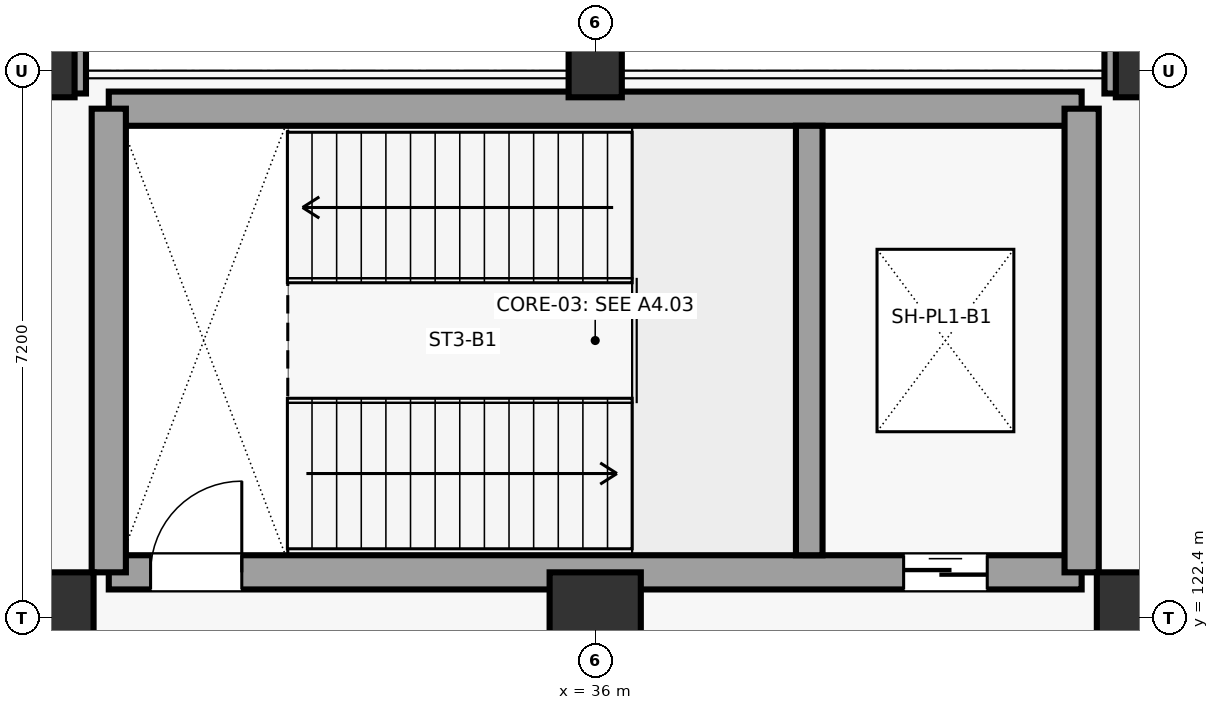
"""IFC4 building model, lengths in metres.
Left out: names, types, materials, properties, quantities, classifications, styles, units other than length and angle.
Written with IfcOpenShell. Run it as: python <this file> out.ifc"""

import sys

from ifc_helpers import new_model, si_unit, direction, frame, frame_2d, origin, origin_2d, place, context, subcontext, project, spatial, rectangle, circle, extrude, element, fill, save


model = new_model("IFC4")
c1 = context("Model", 3, precision=1e-05, world=origin(), true_north=direction((0.0, 1.0)))
c2 = subcontext(c1, "Body", "Model", "MODEL_VIEW")
j1 = project(units=[si_unit("LENGTHUNIT", "METRE"), si_unit("PLANEANGLEUNIT", "RADIAN")], contexts=[c1])
p1 = place(None, origin())
s1 = spatial("IfcSite", under=j1, at=p1, CompositionType="ELEMENT")
p2 = place(p1, origin())
s2 = spatial("IfcBuilding", under=s1, at=p2, CompositionType="ELEMENT")
p3 = place(p2, frame((0.0, 0.0, -5.4)))
s3 = spatial("IfcBuildingStorey", under=s2, at=p3, CompositionType="ELEMENT", Elevation=-5.4)
p4 = place(p3, frame((28.8, 122.4, 0.0), z_axis=(0.0, 0.0, 1.0), x_axis=(1.0, 0.0, 0.0)))
e1 = element("IfcColumn", 1, at=p4, inside=s3, PredefinedType="COLUMN", context=c2, shape_type="SweptSolid", body=[
    extrude(circle(Radius=0.6, at=origin_2d()), origin(), (0.0, 0.0, 1.0), 5.4),
])
p5 = place(p3, frame((28.8, 129.6, 0.0), z_axis=(0.0, 0.0, 1.0), x_axis=(1.0, 0.0, 0.0)))
e2 = element("IfcColumn", 2, at=p5, inside=s3, PredefinedType="COLUMN", context=c2, shape_type="SweptSolid", body=[
    extrude(rectangle(XDim=0.7, YDim=0.7, at=origin_2d()), origin(), (0.0, 0.0, 1.0), 5.4),
])
p6 = place(p3, frame((36.0, 122.4, 0.0), z_axis=(0.0, 0.0, 1.0), x_axis=(1.0, 0.0, 0.0)))
e3 = element("IfcColumn", 3, at=p6, inside=s3, PredefinedType="COLUMN", context=c2, shape_type="SweptSolid", body=[
    extrude(circle(Radius=0.6, at=origin_2d()), origin(), (0.0, 0.0, 1.0), 5.4),
])
p7 = place(p3, frame((36.0, 129.6, 0.0), z_axis=(0.0, 0.0, 1.0), x_axis=(1.0, 0.0, 0.0)))
e4 = element("IfcColumn", 4, at=p7, inside=s3, PredefinedType="COLUMN", context=c2, shape_type="SweptSolid", body=[
    extrude(rectangle(XDim=0.7, YDim=0.7, at=origin_2d()), origin(), (0.0, 0.0, 1.0), 5.4),
])
p8 = place(p3, frame((43.2, 122.4, 0.0), z_axis=(0.0, 0.0, 1.0), x_axis=(1.0, 0.0, 0.0)))
e5 = element("IfcColumn", 5, at=p8, inside=s3, PredefinedType="COLUMN", context=c2, shape_type="SweptSolid", body=[
    extrude(circle(Radius=0.6, at=origin_2d()), origin(), (0.0, 0.0, 1.0), 5.4),
])
p9 = place(p3, frame((43.2, 129.6, 0.0), z_axis=(0.0, 0.0, 1.0), x_axis=(1.0, 0.0, 0.0)))
e6 = element("IfcColumn", 6, at=p9, inside=s3, PredefinedType="COLUMN", context=c2, shape_type="SweptSolid", body=[
    extrude(rectangle(XDim=0.7, YDim=0.7, at=origin_2d()), origin(), (0.0, 0.0, 1.0), 5.4),
])
p10 = place(p3, frame((0.0, 129.6, 0.0), z_axis=(0.0, 0.0, 1.0), x_axis=(1.0, 0.0, 0.0)))
e7 = element("IfcWall", 7, at=p10, inside=s3, PredefinedType="USERDEFINED", context=c2, shape_type="SweptSolid", body=[
    extrude(rectangle(XDim=29.3, YDim=0.6, at=frame_2d((14.65, 0.0))), origin(), (0.0, 0.0, 1.0), 4.98),
])
p11 = place(p3, frame((42.7, 129.6, 0.0), z_axis=(0.0, 0.0, 1.0), x_axis=(1.0, 0.0, 0.0)))
e8 = element("IfcWall", 8, at=p11, inside=s3, PredefinedType="USERDEFINED", context=c2, shape_type="SweptSolid", body=[
    extrude(rectangle(XDim=29.8, YDim=0.6, at=frame_2d((14.9, 0.0))), origin(), (0.0, 0.0, 1.0), 4.98),
])
p12 = place(p3, frame((29.6, 123.0, 0.0), z_axis=(0.0, 0.0, 1.0), x_axis=(1.0, 0.0, 0.0)))
e9 = element("IfcWall", 9, at=p12, inside=s3, PredefinedType="SHEAR", context=c2, shape_type="SweptSolid", body=[
    extrude(rectangle(XDim=12.8, YDim=0.45, at=frame_2d((6.4, 0.0))), origin(), (0.0, 0.0, 1.0), 5.02),
])
p13 = place(p12, frame((0.55, 0.0, 0.0)))
e10 = element("IfcOpeningElement", 10, at=p13, cuts=e9, PredefinedType="OPENING", context=c2, shape_type="SweptSolid", body=[
    extrude(rectangle(XDim=1.2, YDim=2.25, at=frame_2d((0.6, 1.125))), frame((0.0, 0.235, 0.0), z_axis=(0.0, -1.0, 0.0), x_axis=(1.0, 0.0, 0.0)), (0.0, 0.0, 1.0), 0.47),
])
p14 = place(p12, frame((10.458, 0.0, 0.0)))
e11 = element("IfcOpeningElement", 11, at=p14, cuts=e9, PredefinedType="OPENING", context=c2, shape_type="SweptSolid", body=[
    extrude(rectangle(XDim=1.1, YDim=2.2, at=frame_2d((0.55, 1.1))), frame((0.0, 0.235, 0.0), z_axis=(0.0, -1.0, 0.0), x_axis=(1.0, 0.0, 0.0)), (0.0, 0.0, 1.0), 0.47),
])
p15 = place(p3, frame((29.6, 129.1, 0.0), z_axis=(0.0, 0.0, 1.0), x_axis=(1.0, 0.0, 0.0)))
e12 = element("IfcWall", 12, at=p15, inside=s3, PredefinedType="SHEAR", context=c2, shape_type="SweptSolid", body=[
    extrude(rectangle(XDim=12.8, YDim=0.45, at=frame_2d((6.4, 0.0))), origin(), (0.0, 0.0, 1.0), 5.02),
])
for number, where, z_axis, x_axis in (
    (13, (29.6, 123.0, 0.0), (0.0, 0.0, 1.0), (0.0, 1.0, 0.0)),
    (14, (42.4, 123.0, 0.0), (0.0, 0.0, 1.0), (0.0, 1.0, 0.0)),
):
    element("IfcWall", number, at=place(p3, frame(where, z_axis=z_axis, x_axis=x_axis)), inside=s3, PredefinedType="SHEAR", context=c2, shape_type="SweptSolid", body=[
        extrude(rectangle(XDim=6.1, YDim=0.45, at=frame_2d((3.05, 0.0))), origin(), (0.0, 0.0, 1.0), 5.02),
    ])
p16 = place(p3, frame((38.816, 123.225, 0.0), z_axis=(0.0, 0.0, 1.0), x_axis=(0.0, 1.0, 0.0)))
e15 = element("IfcWall", 15, at=p16, inside=s3, PredefinedType="SHEAR", context=c2, shape_type="SweptSolid", body=[
    extrude(rectangle(XDim=5.65, YDim=0.35, at=frame_2d((2.825, 0.0))), origin(), (0.0, 0.0, 1.0), 5.02),
])
p17 = place(p13, origin())
e16 = element("IfcDoor", 16, at=p17, inside=s3, OperationType="SINGLE_SWING_RIGHT", PredefinedType="DOOR", context=c2, shape_type="SweptSolid", body=[
    extrude(rectangle(XDim=1.2, YDim=2.25, at=frame_2d((0.6, 1.125))), frame((0.0, 0.025, 0.0), z_axis=(0.0, -1.0, 0.0), x_axis=(1.0, 0.0, 0.0)), (0.0, 0.0, 1.0), 0.05),
])
fill(e10, e16)
p18 = place(p14, origin())
e17 = element("IfcDoor", 17, at=p18, inside=s3, OperationType="SLIDING_TO_LEFT", PredefinedType="DOOR", context=c2, shape_type="SweptSolid", body=[
    extrude(rectangle(XDim=1.1, YDim=2.2, at=frame_2d((0.55, 1.1))), frame((0.0, 0.025, 0.0), z_axis=(0.0, -1.0, 0.0), x_axis=(1.0, 0.0, 0.0)), (0.0, 0.0, 1.0), 0.05),
])
fill(e11, e17)
save(model, sys.argv[1])
